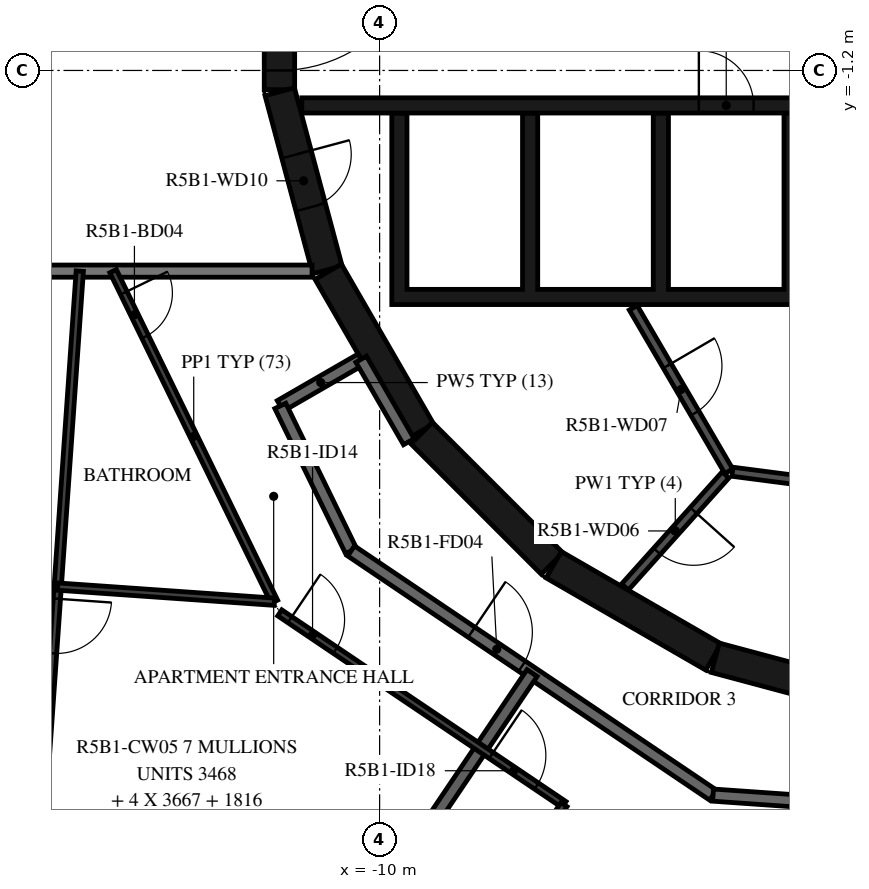
"""IFC4 building model, lengths in metres.
Left out: names, types, materials, properties, quantities, classifications, styles, units other than length and angle.
Written with IfcOpenShell. Run it as: python <this file> out.ifc"""

import sys

from ifc_helpers import new_model, si_unit, direction, frame, frame_2d, origin, place, context, subcontext, project, spatial, polyline, rectangle, outline, extrude, element, fill, save


model = new_model("IFC4")
c1 = context("Model", 3, precision=1e-05, world=origin(), true_north=direction((0.0, 1.0)))
c2 = subcontext(c1, "Body", "Model", "MODEL_VIEW")
j1 = project(units=[si_unit("LENGTHUNIT", "METRE"), si_unit("PLANEANGLEUNIT", "RADIAN")], contexts=[c1])
p1 = place(None, origin())
s1 = spatial("IfcSite", under=j1, at=p1, CompositionType="ELEMENT")
p2 = place(p1, origin())
s2 = spatial("IfcBuilding", under=s1, at=p2, CompositionType="ELEMENT")
p3 = place(p2, frame((0.0, 0.0, 198.9)))
s3 = spatial("IfcBuildingStorey", under=s2, at=p3, CompositionType="ELEMENT", Elevation=198.9)
p4 = place(p3, frame((-11.647, 1.516, 0.0), z_axis=(0.0, 0.0, 1.0), x_axis=(0.0, -1.0, 0.0)))
e1 = element("IfcWall", 1, at=p4, inside=s3, PredefinedType="SHEAR", context=c2, shape_type="SweptSolid", body=[
    extrude(rectangle(XDim=3.033, YDim=0.5, at=frame_2d((1.516, 0.0))), origin(), (0.0, 0.0, 1.0), 3.12),
])
p5 = place(p4, frame((0.316, 0.0, 0.0)))
e2 = element("IfcOpeningElement", 2, at=p5, cuts=e1, PredefinedType="OPENING", context=c2, shape_type="SweptSolid", body=[
    extrude(rectangle(XDim=2.4, YDim=2.1, at=frame_2d((1.2, 1.05))), frame((0.0, 0.26, 0.0), z_axis=(0.0, -1.0, 0.0), x_axis=(1.0, 0.0, 0.0)), (0.0, 0.0, 1.0), 0.52),
])
p6 = place(p3, frame((-11.643, -1.55, 0.0), z_axis=(0.0, 0.0, 1.0), x_axis=(0.258734743916, -0.965948410781, 0.0)))
e3 = element("IfcWall", 3, at=p6, inside=s3, PredefinedType="SHEAR", context=c2, shape_type="SweptSolid", body=[
    extrude(rectangle(XDim=3.033, YDim=0.5, at=frame_2d((1.516, 0.0))), origin(), (0.0, 0.0, 1.0), 3.12),
])
p7 = place(p6, frame((1.066, 0.0, 0.0)))
e4 = element("IfcOpeningElement", 4, at=p7, cuts=e3, PredefinedType="OPENING", context=c2, shape_type="SweptSolid", body=[
    extrude(rectangle(XDim=0.9, YDim=2.1, at=frame_2d((0.45, 1.05))), frame((0.0, 0.26, 0.0), z_axis=(0.0, -1.0, 0.0), x_axis=(1.0, 0.0, 0.0)), (0.0, 0.0, 1.0), 0.52),
])
p8 = place(p3, frame((-10.845, -4.51, 0.0), z_axis=(0.0, 0.0, 1.0), x_axis=(0.500087131594, -0.865975092491, 0.0)))
e5 = element("IfcWall", 5, at=p8, inside=s3, PredefinedType="SHEAR", context=c2, shape_type="SweptSolid", body=[
    extrude(rectangle(XDim=3.033, YDim=0.5, at=frame_2d((1.516, 0.0))), origin(), (0.0, 0.0, 1.0), 3.12),
])
p9 = place(p3, frame((-9.308, -7.164, 0.0), z_axis=(0.0, 0.0, 1.0), x_axis=(0.707106781187, -0.707106781187, 0.0)))
e6 = element("IfcWall", 6, at=p9, inside=s3, PredefinedType="SHEAR", context=c2, shape_type="SweptSolid", body=[
    extrude(rectangle(XDim=3.032, YDim=0.5, at=frame_2d((1.516, 0.0))), origin(), (0.0, 0.0, 1.0), 3.12),
])
for number, where, z_axis, x_axis in (
    (7, (-7.137, -9.329, 0.0), (0.0, 0.0, 1.0), (0.866, -0.5, 0.0)),
    (8, (-4.479, -10.858, 0.0), (0.0, 0.0, 1.0), (0.966, -0.259, 0.0)),
):
    element("IfcWall", number, at=place(p3, frame(where, z_axis=z_axis, x_axis=x_axis)), inside=s3, PredefinedType="SHEAR", context=c2, shape_type="SweptSolid", body=[
        extrude(rectangle(XDim=3.033, YDim=0.5, at=frame_2d((1.516, 0.0))), origin(), (0.0, 0.0, 1.0), 3.12),
    ])
p10 = place(p3, origin())
e9 = element("IfcWall", 9, at=p10, inside=s3, PredefinedType="SHEAR", context=c2, shape_type="SweptSolid", body=[
    extrude(outline(polyline([(9.8, -5.05), (9.8, -4.8), (9.8, -1.9), (9.55, -1.9), (9.55, -4.8), (7.65, -4.8), (7.65, -1.9), (7.4, -1.9), (7.4, -4.8), (5.5, -4.8), (5.5, -1.9), (5.25, -1.9), (5.25, -4.8), (3.35, -4.8), (3.35, -1.9), (3.1, -1.9), (3.1, -4.8), (1.2, -4.8), (1.2, -1.9), (0.95, -1.9), (0.95, -4.8), (-0.95, -4.8), (-0.95, -1.9), (-1.2, -1.9), (-1.2, -4.8), (-3.1, -4.8), (-3.1, -1.9), (-3.35, -1.9), (-3.35, -4.8), (-5.25, -4.8), (-5.25, -1.9), (-5.5, -1.9), (-5.5, -4.8), (-7.4, -4.8), (-7.4, -1.9), (-7.65, -1.9), (-7.65, -4.8), (-9.55, -4.8), (-9.55, -1.9), (-9.8, -1.9), (-9.8, -4.8), (-9.8, -5.05), (9.8, -5.05)])), origin(), (0.0, 0.0, 1.0), 3.12),
])
p11 = place(p3, frame((-11.28, -1.775, 0.0), z_axis=(0.0, 0.0, 1.0), x_axis=(1.0, 0.0, 0.0)))
e10 = element("IfcWall", 10, at=p11, inside=s3, PredefinedType="SHEAR", context=c2, shape_type="SweptSolid", body=[
    extrude(rectangle(XDim=14.38, YDim=0.25, at=frame_2d((7.19, 0.0))), origin(), (0.0, 0.0, 1.0), 3.12),
])
p12 = place(p11, frame((12.88, 0.0, 0.0)))
e11 = element("IfcOpeningElement", 11, at=p12, cuts=e10, PredefinedType="OPENING", context=c2, shape_type="SweptSolid", body=[
    extrude(rectangle(XDim=1.1, YDim=2.1, at=frame_2d((0.55, 1.05))), frame((0.0, 0.135, 0.0), z_axis=(0.0, -1.0, 0.0), x_axis=(1.0, 0.0, 0.0)), (0.0, 0.0, 1.0), 0.27),
])
p13 = place(p11, frame((6.53, 0.0, 0.0)))
e12 = element("IfcOpeningElement", 12, at=p13, cuts=e10, PredefinedType="OPENING", context=c2, shape_type="SweptSolid", body=[
    extrude(rectangle(XDim=0.9, YDim=2.1, at=frame_2d((0.45, 1.05))), frame((0.0, 0.135, 0.0), z_axis=(0.0, -1.0, 0.0), x_axis=(1.0, 0.0, 0.0)), (0.0, 0.0, 1.0), 0.27),
])
p14 = place(p11, frame((8.68, 0.0, 0.0)))
e13 = element("IfcOpeningElement", 13, at=p14, cuts=e10, PredefinedType="OPENING", context=c2, shape_type="SweptSolid", body=[
    extrude(rectangle(XDim=0.9, YDim=2.1, at=frame_2d((0.45, 1.05))), frame((0.0, 0.135, 0.0), z_axis=(0.0, -1.0, 0.0), x_axis=(1.0, 0.0, 0.0)), (0.0, 0.0, 1.0), 0.27),
])
p15 = place(p11, frame((10.83, 0.0, 0.0)))
e14 = element("IfcOpeningElement", 14, at=p15, cuts=e10, PredefinedType="OPENING", context=c2, shape_type="SweptSolid", body=[
    extrude(rectangle(XDim=0.9, YDim=2.1, at=frame_2d((0.45, 1.05))), frame((0.0, 0.135, 0.0), z_axis=(0.0, -1.0, 0.0), x_axis=(1.0, 0.0, 0.0)), (0.0, 0.0, 1.0), 0.27),
])
p16 = place(p3, frame((-5.829, -5.102, 0.0), z_axis=(0.0, 0.0, 1.0), x_axis=(0.504480008384, -0.863423373057, 0.0)))
e15 = element("IfcWall", 15, at=p16, inside=s3, PredefinedType="PARTITIONING", context=c2, shape_type="SweptSolid", body=[
    extrude(rectangle(XDim=3.115, YDim=0.15, at=frame_2d((1.558, 0.0))), origin(), (0.0, 0.0, 1.0), 3.12),
])
p17 = place(p16, frame((1.107, 0.0, 0.0)))
e16 = element("IfcOpeningElement", 16, at=p17, cuts=e15, PredefinedType="OPENING", context=c2, shape_type="SweptSolid", body=[
    extrude(rectangle(XDim=0.9, YDim=2.1, at=frame_2d((0.45, 1.05))), frame((0.0, 0.085, 0.0), z_axis=(0.0, -1.0, 0.0), x_axis=(1.0, 0.0, 0.0)), (0.0, 0.0, 1.0), 0.17),
])
p18 = place(p3, frame((-4.311, -7.851, 0.0), z_axis=(0.0, 0.0, 1.0), x_axis=(-0.667869133096, -0.744278725383, 0.0)))
e17 = element("IfcWall", 17, at=p18, inside=s3, PredefinedType="PARTITIONING", context=c2, shape_type="SweptSolid", body=[
    extrude(rectangle(XDim=2.476, YDim=0.15, at=frame_2d((1.238, 0.0))), origin(), (0.0, 0.0, 1.0), 3.12),
])
p19 = place(p18, frame((0.788, 0.0, 0.0)))
e18 = element("IfcOpeningElement", 18, at=p19, cuts=e17, PredefinedType="OPENING", context=c2, shape_type="SweptSolid", body=[
    extrude(rectangle(XDim=0.9, YDim=2.1, at=frame_2d((0.45, 1.05))), frame((0.0, 0.085, 0.0), z_axis=(0.0, -1.0, 0.0), x_axis=(1.0, 0.0, 0.0)), (0.0, 0.0, 1.0), 0.17),
])
p20 = place(p3, frame((-4.198, -7.799, 0.0), z_axis=(0.0, 0.0, 1.0), x_axis=(0.991686747293, -0.128675542523, 0.0)))
e19 = element("IfcWall", 19, at=p20, inside=s3, PredefinedType="PARTITIONING", context=c2, shape_type="SweptSolid", body=[
    extrude(rectangle(XDim=1.793, YDim=0.15, at=frame_2d((0.896, 0.0))), origin(), (0.0, 0.0, 1.0), 3.12),
])
p21 = place(p3, frame((-10.303, -5.949, 0.0), z_axis=(0.0, 0.0, 1.0), x_axis=(-0.866042588199, -0.499970234539, 0.0)))
e20 = element("IfcWall", 20, at=p21, inside=s3, PredefinedType="STANDARD", context=c2, shape_type="SweptSolid", body=[
    extrude(rectangle(XDim=1.535, YDim=0.2, at=frame_2d((0.768, 0.0))), origin(), (0.0, 0.0, 1.0), 3.12),
])
p22 = place(p3, frame((-11.633, -6.716, 0.0), z_axis=(0.0, 0.0, 1.0), x_axis=(0.438322116278, -0.898817958422, 0.0)))
e21 = element("IfcWall", 21, at=p22, inside=s3, PredefinedType="STANDARD", context=c2, shape_type="SweptSolid", body=[
    extrude(rectangle(XDim=2.654, YDim=0.2, at=frame_2d((1.327, 0.0))), origin(), (0.0, 0.0, 1.0), 3.12),
])
p23 = place(p3, frame((-10.47, -9.101, 0.0), z_axis=(0.0, 0.0, 1.0), x_axis=(0.829035841718, -0.559195469534, 0.0)))
e22 = element("IfcWall", 22, at=p23, inside=s3, PredefinedType="STANDARD", context=c2, shape_type="SweptSolid", body=[
    extrude(rectangle(XDim=7.181, YDim=0.2, at=frame_2d((3.591, 0.0))), origin(), (0.0, 0.0, 1.0), 3.12),
])
p24 = place(p23, frame((2.39, 0.0, 0.0)))
e23 = element("IfcOpeningElement", 23, at=p24, cuts=e22, PredefinedType="OPENING", context=c2, shape_type="SweptSolid", body=[
    extrude(rectangle(XDim=1.0, YDim=2.1, at=frame_2d((0.5, 1.05))), frame((0.0, 0.11, 0.0), z_axis=(0.0, -1.0, 0.0), x_axis=(1.0, 0.0, 0.0)), (0.0, 0.0, 1.0), 0.22),
])
p25 = place(p3, frame((-9.52, -7.305, 0.0), z_axis=(0.0, 0.0, 1.0), x_axis=(-0.500028278809, 0.866009076391, 0.0)))
e24 = element("IfcWall", 24, at=p25, inside=s3, PredefinedType="STANDARD", context=c2, shape_type="SweptSolid", body=[
    extrude(rectangle(XDim=1.566, YDim=0.2, at=frame_2d((0.783, 0.0))), origin(), (0.0, 0.0, 1.0), 3.12),
])
p26 = place(p3, frame((-4.517, -13.117, 0.0), z_axis=(0.0, 0.0, 1.0), x_axis=(0.997564669554, -0.069747616856, 0.0)))
e25 = element("IfcWall", 25, at=p26, inside=s3, PredefinedType="STANDARD", context=c2, shape_type="SweptSolid", body=[
    extrude(rectangle(XDim=6.885, YDim=0.2, at=frame_2d((3.443, 0.0))), origin(), (0.0, 0.0, 1.0), 3.12),
])
p27 = place(p26, frame((3.2, 0.0, 0.0)))
e26 = element("IfcOpeningElement", 26, at=p27, cuts=e25, PredefinedType="OPENING", context=c2, shape_type="SweptSolid", body=[
    extrude(rectangle(XDim=1.0, YDim=2.1, at=frame_2d((0.5, 1.05))), frame((0.0, 0.11, 0.0), z_axis=(0.0, -1.0, 0.0), x_axis=(1.0, 0.0, 0.0)), (0.0, 0.0, 1.0), 0.22),
])
p28 = place(p3, frame((-17.9, -4.5, 0.0), z_axis=(0.0, 0.0, 1.0), x_axis=(1.0, 0.0, 0.0)))
e27 = element("IfcWall", 27, at=p28, inside=s3, PredefinedType="STANDARD", context=c2, shape_type="SweptSolid", body=[
    extrude(rectangle(XDim=6.789, YDim=0.2, at=frame_2d((3.394, 0.0))), origin(), (0.0, 0.0, 1.0), 3.12),
])
p29 = place(p3, frame((-10.066, -14.924, 0.0), z_axis=(0.0, 0.0, 1.0), x_axis=(0.559173899945, 0.829050390278, 0.0)))
e28 = element("IfcWall", 28, at=p29, inside=s3, PredefinedType="STANDARD", context=c2, shape_type="SweptSolid", body=[
    extrude(rectangle(XDim=4.601, YDim=0.2, at=frame_2d((2.301, 0.0))), origin(), (0.0, 0.0, 1.0), 3.12),
])
p30 = place(p3, frame((-14.383, -4.5, 0.0), z_axis=(0.0, 0.0, 1.0), x_axis=(0.438393414895, -0.898783185077, 0.0)))
e29 = element("IfcWall", 29, at=p30, inside=s3, PredefinedType="PARTITIONING", context=c2, shape_type="SweptSolid", body=[
    extrude(rectangle(XDim=6.049, YDim=0.12, at=frame_2d((3.024, 0.0))), origin(), (0.0, 0.0, 1.0), 3.12),
])
p31 = place(p30, frame((0.4, 0.0, 0.0)))
e30 = element("IfcOpeningElement", 30, at=p31, cuts=e29, PredefinedType="OPENING", context=c2, shape_type="SweptSolid", body=[
    extrude(rectangle(XDim=0.8, YDim=2.1, at=frame_2d((0.4, 1.05))), frame((0.0, 0.07, 0.0), z_axis=(0.0, -1.0, 0.0), x_axis=(1.0, 0.0, 0.0)), (0.0, 0.0, 1.0), 0.14),
])
p32 = place(p3, frame((-11.642, -10.12, 0.0), z_axis=(0.0, 0.0, 1.0), x_axis=(0.829033377599, -0.559199122698, 0.0)))
e31 = element("IfcWall", 31, at=p32, inside=s3, PredefinedType="PARTITIONING", context=c2, shape_type="SweptSolid", body=[
    extrude(rectangle(XDim=5.638, YDim=0.12, at=frame_2d((2.819, 0.0))), origin(), (0.0, 0.0, 1.0), 3.12),
])
p33 = place(p32, frame((0.2, 0.0, 0.0)))
e32 = element("IfcOpeningElement", 32, at=p33, cuts=e31, PredefinedType="OPENING", context=c2, shape_type="SweptSolid", body=[
    extrude(rectangle(XDim=0.9, YDim=2.1, at=frame_2d((0.45, 1.05))), frame((0.0, 0.07, 0.0), z_axis=(0.0, -1.0, 0.0), x_axis=(1.0, 0.0, 0.0)), (0.0, 0.0, 1.0), 0.14),
])
p34 = place(p32, frame((4.192, 0.0, 0.0)))
e33 = element("IfcOpeningElement", 33, at=p34, cuts=e31, PredefinedType="OPENING", context=c2, shape_type="SweptSolid", body=[
    extrude(rectangle(XDim=0.9, YDim=2.1, at=frame_2d((0.45, 1.05))), frame((0.0, 0.07, 0.0), z_axis=(0.0, -1.0, 0.0), x_axis=(1.0, 0.0, 0.0)), (0.0, 0.0, 1.0), 0.14),
])
p35 = place(p3, frame((-14.931, -4.5, 0.0), z_axis=(0.0, 0.0, 1.0), x_axis=(-0.069751708439, -0.997564383471, 0.0)))
e34 = element("IfcWall", 34, at=p35, inside=s3, PredefinedType="PARTITIONING", context=c2, shape_type="SweptSolid", body=[
    extrude(rectangle(XDim=11.894, YDim=0.12, at=frame_2d((5.947, 0.0))), origin(), (0.0, 0.0, 1.0), 3.12),
])
p36 = place(p35, frame((5.4, 0.0, 0.0)))
e35 = element("IfcOpeningElement", 35, at=p36, cuts=e34, PredefinedType="OPENING", context=c2, shape_type="SweptSolid", body=[
    extrude(rectangle(XDim=0.9, YDim=2.1, at=frame_2d((0.45, 1.05))), frame((0.0, 0.07, 0.0), z_axis=(0.0, -1.0, 0.0), x_axis=(1.0, 0.0, 0.0)), (0.0, 0.0, 1.0), 0.14),
])
p37 = place(p3, frame((-15.294, -9.688, 0.0), z_axis=(0.0, 0.0, 1.0), x_axis=(0.997565819809, -0.069731163391, 0.0)))
e36 = element("IfcWall", 36, at=p37, inside=s3, PredefinedType="PARTITIONING", context=c2, shape_type="SweptSolid", body=[
    extrude(rectangle(XDim=3.571, YDim=0.12, at=frame_2d((1.786, 0.0))), origin(), (0.0, 0.0, 1.0), 3.12),
])
p38 = place(p3, frame((-6.968, -13.273, 0.0), z_axis=(0.0, 0.0, 1.0), x_axis=(-0.559283007371, -0.828976789582, 0.0)))
e37 = element("IfcWall", 37, at=p38, inside=s3, PredefinedType="PARTITIONING", context=c2, shape_type="SweptSolid", body=[
    extrude(rectangle(XDim=1.325, YDim=0.12, at=frame_2d((0.663, 0.0))), origin(), (0.0, 0.0, 1.0), 3.12),
])
p39 = place(p5, origin())
e38 = element("IfcDoor", 38, at=p39, inside=s3, OperationType="DOUBLE_DOOR_SINGLE_SWING", PredefinedType="DOOR", context=c2, shape_type="SweptSolid", body=[
    extrude(rectangle(XDim=2.4, YDim=2.1, at=frame_2d((1.2, 1.05))), frame((0.0, 0.025, 0.0), z_axis=(0.0, -1.0, 0.0), x_axis=(1.0, 0.0, 0.0)), (0.0, 0.0, 1.0), 0.05),
])
fill(e2, e38)
p40 = place(p13, origin())
e39 = element("IfcDoor", 39, at=p40, inside=s3, OperationType="SINGLE_SWING_LEFT", PredefinedType="DOOR", context=c2, shape_type="SweptSolid", body=[
    extrude(rectangle(XDim=0.9, YDim=2.1, at=frame_2d((0.45, 1.05))), frame((0.0, 0.025, 0.0), z_axis=(0.0, -1.0, 0.0), x_axis=(1.0, 0.0, 0.0)), (0.0, 0.0, 1.0), 0.05),
])
fill(e12, e39)
p41 = place(p19, origin())
e40 = element("IfcDoor", 40, at=p41, inside=s3, OperationType="SINGLE_SWING_RIGHT", PredefinedType="DOOR", context=c2, shape_type="SweptSolid", body=[
    extrude(rectangle(XDim=0.9, YDim=2.1, at=frame_2d((0.45, 1.05))), frame((0.0, 0.025, 0.0), z_axis=(0.0, -1.0, 0.0), x_axis=(1.0, 0.0, 0.0)), (0.0, 0.0, 1.0), 0.05),
])
fill(e18, e40)
p42 = place(p17, origin())
e41 = element("IfcDoor", 41, at=p42, inside=s3, OperationType="SINGLE_SWING_LEFT", PredefinedType="DOOR", context=c2, shape_type="SweptSolid", body=[
    extrude(rectangle(XDim=0.9, YDim=2.1, at=frame_2d((0.45, 1.05))), frame((0.0, 0.025, 0.0), z_axis=(0.0, -1.0, 0.0), x_axis=(1.0, 0.0, 0.0)), (0.0, 0.0, 1.0), 0.05),
])
fill(e16, e41)
p43 = place(p7, origin())
e42 = element("IfcDoor", 42, at=p43, inside=s3, OperationType="SINGLE_SWING_RIGHT", PredefinedType="DOOR", context=c2, shape_type="SweptSolid", body=[
    extrude(rectangle(XDim=0.9, YDim=2.1, at=frame_2d((0.45, 1.05))), frame((0.0, 0.025, 0.0), z_axis=(0.0, -1.0, 0.0), x_axis=(1.0, 0.0, 0.0)), (0.0, 0.0, 1.0), 0.05),
])
fill(e4, e42)
p44 = place(p24, origin())
e43 = element("IfcDoor", 43, at=p44, inside=s3, OperationType="SINGLE_SWING_RIGHT", PredefinedType="DOOR", context=c2, shape_type="SweptSolid", body=[
    extrude(rectangle(XDim=1.0, YDim=2.1, at=frame_2d((0.5, 1.05))), frame((0.0, 0.025, 0.0), z_axis=(0.0, -1.0, 0.0), x_axis=(1.0, 0.0, 0.0)), (0.0, 0.0, 1.0), 0.05),
])
fill(e23, e43)
p45 = place(p31, origin())
e44 = element("IfcDoor", 44, at=p45, inside=s3, OperationType="SINGLE_SWING_RIGHT", PredefinedType="DOOR", context=c2, shape_type="SweptSolid", body=[
    extrude(rectangle(XDim=0.8, YDim=2.1, at=frame_2d((0.4, 1.05))), frame((0.0, 0.025, 0.0), z_axis=(0.0, -1.0, 0.0), x_axis=(1.0, 0.0, 0.0)), (0.0, 0.0, 1.0), 0.05),
])
fill(e30, e44)
p46 = place(p33, origin())
e45 = element("IfcDoor", 45, at=p46, inside=s3, OperationType="SINGLE_SWING_RIGHT", PredefinedType="DOOR", context=c2, shape_type="SweptSolid", body=[
    extrude(rectangle(XDim=0.9, YDim=2.1, at=frame_2d((0.45, 1.05))), frame((0.0, 0.025, 0.0), z_axis=(0.0, -1.0, 0.0), x_axis=(1.0, 0.0, 0.0)), (0.0, 0.0, 1.0), 0.05),
])
fill(e32, e45)
p47 = place(p36, origin())
e46 = element("IfcDoor", 46, at=p47, inside=s3, OperationType="SINGLE_SWING_RIGHT", PredefinedType="DOOR", context=c2, shape_type="SweptSolid", body=[
    extrude(rectangle(XDim=0.9, YDim=2.1, at=frame_2d((0.45, 1.05))), frame((0.0, 0.025, 0.0), z_axis=(0.0, -1.0, 0.0), x_axis=(1.0, 0.0, 0.0)), (0.0, 0.0, 1.0), 0.05),
])
fill(e35, e46)
p48 = place(p34, origin())
e47 = element("IfcDoor", 47, at=p48, inside=s3, OperationType="SINGLE_SWING_LEFT", PredefinedType="DOOR", context=c2, shape_type="SweptSolid", body=[
    extrude(rectangle(XDim=0.9, YDim=2.1, at=frame_2d((0.45, 1.05))), frame((0.0, 0.025, 0.0), z_axis=(0.0, -1.0, 0.0), x_axis=(1.0, 0.0, 0.0)), (0.0, 0.0, 1.0), 0.05),
])
fill(e33, e47)
save(model, sys.argv[1])
